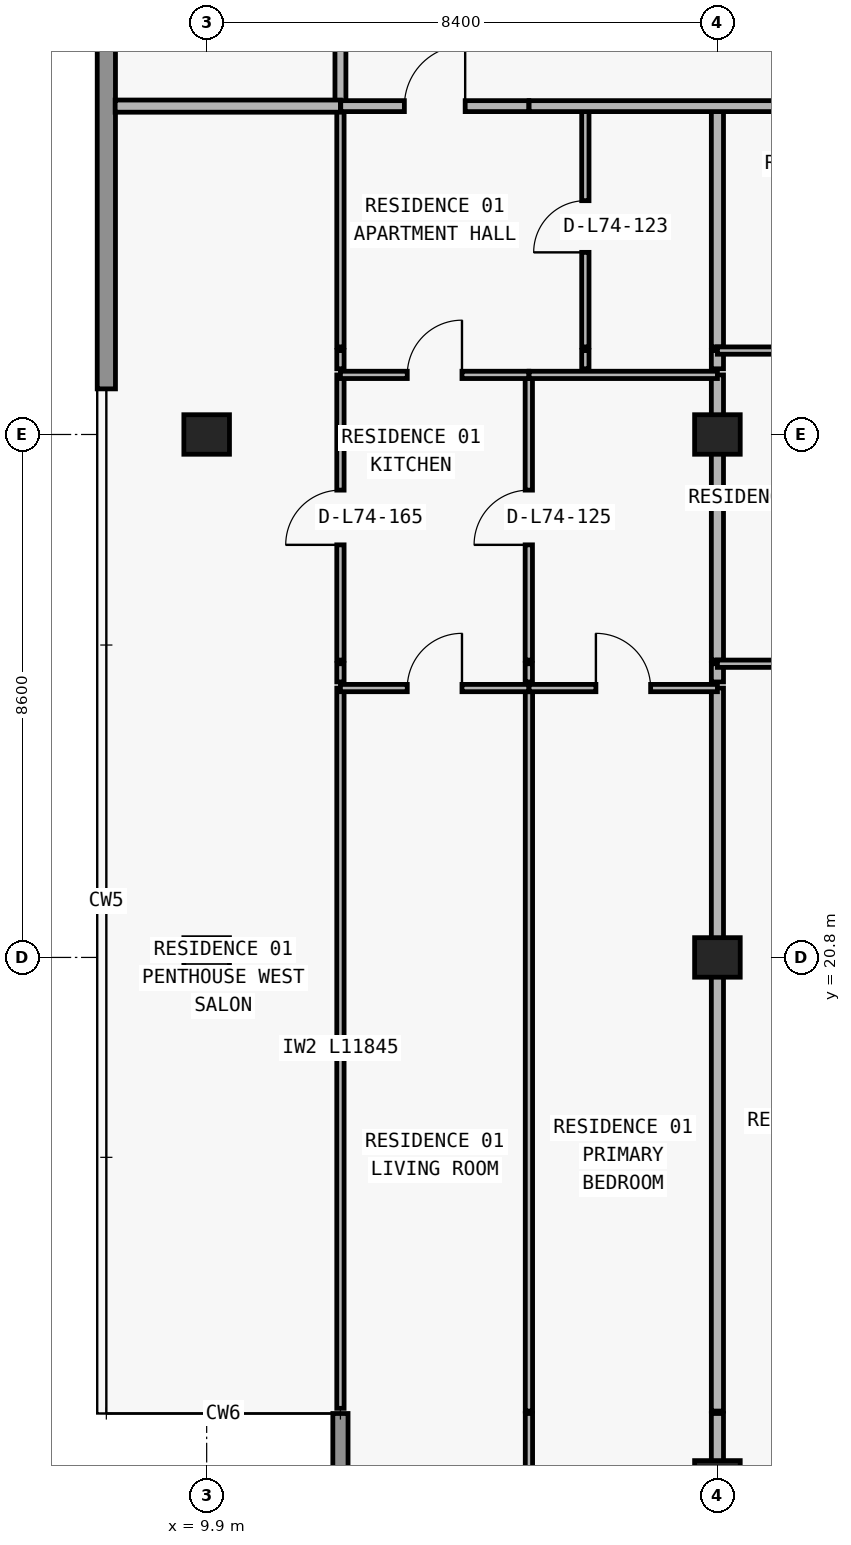
"""IFC4 building model, lengths in metres.
Left out: names, types, materials, properties, quantities, classifications, styles, units other than length and angle.
Written with IfcOpenShell. Run it as: python <this file> out.ifc"""

import sys

from ifc_helpers import new_model, si_unit, direction, frame, frame_2d, origin, origin_2d, place, context, subcontext, project, spatial, rectangle, extrude, element, fill, save


model = new_model("IFC4")
c1 = context("Model", 3, precision=1e-05, world=origin(), true_north=direction((0.0, 1.0)))
c2 = subcontext(c1, "Body", "Model", "MODEL_VIEW")
j1 = project(units=[si_unit("LENGTHUNIT", "METRE"), si_unit("PLANEANGLEUNIT", "RADIAN")], contexts=[c1])
p1 = place(None, origin())
s1 = spatial("IfcSite", under=j1, at=p1, CompositionType="ELEMENT")
p2 = place(p1, origin())
s2 = spatial("IfcBuilding", under=s1, at=p2, CompositionType="ELEMENT")
p3 = place(p2, frame((0.0, 0.0, 262.8)))
s3 = spatial("IfcBuildingStorey", under=s2, at=p3, CompositionType="ELEMENT", Elevation=262.8)
for number, where, z_axis, x_axis in (
    (1, (18.3, 12.2, 0.0), (0.0, 0.0, 1.0), (1.0, 0.0, 0.0)),
    (2, (9.9, 20.8, 0.0), (0.0, 0.0, 1.0), (1.0, 0.0, 0.0)),
    (3, (18.3, 20.8, 0.0), (0.0, 0.0, 1.0), (1.0, 0.0, 0.0)),
    (4, (9.9, 29.4, 0.0), (0.0, 0.0, 1.0), (1.0, 0.0, 0.0)),
    (5, (18.3, 29.4, 0.0), (0.0, 0.0, 1.0), (1.0, 0.0, 0.0)),
):
    element("IfcColumn", number, at=place(p3, frame(where, z_axis=z_axis, x_axis=x_axis)), inside=s3, PredefinedType="COLUMN", context=c2, shape_type="SweptSolid", body=[
        extrude(rectangle(XDim=0.75, YDim=0.65, at=origin_2d()), origin(), (0.0, 0.0, 1.0), 3.05),
    ])
p4 = place(p3, frame((12.1, 13.3, 0.0), z_axis=(0.0, 0.0, 1.0), x_axis=(0.0, -1.0, 0.0)))
e6 = element("IfcWall", 6, at=p4, inside=s3, PredefinedType="ELEMENTEDWALL", context=c2, shape_type="SweptSolid", body=[
    extrude(rectangle(XDim=3.45, YDim=0.25, at=frame_2d((1.725, 0.0))), origin(), (0.0, 0.0, 1.0), 3.05),
])
p5 = place(p3, frame((8.25, 30.15, 0.0), z_axis=(0.0, 0.0, 1.0), x_axis=(0.0, 1.0, 0.0)))
e7 = element("IfcWall", 7, at=p5, inside=s3, PredefinedType="STANDARD", context=c2, shape_type="SweptSolid", body=[
    extrude(rectangle(XDim=16.85, YDim=0.3, at=frame_2d((8.425, 0.0))), origin(), (0.0, 0.0, 1.0), 3.05),
])
p6 = place(p3, frame((12.1, 13.385, 0.0), z_axis=(0.0, 0.0, 1.0), x_axis=(0.0, 1.0, 0.0)))
e8 = element("IfcWall", 8, at=p6, inside=s3, PredefinedType="PARTITIONING", context=c2, shape_type="SweptSolid", body=[
    extrude(rectangle(XDim=11.845, YDim=0.12, at=frame_2d((5.922, 0.0))), origin(), (0.0, 0.0, 1.0), 2.578),
])
p7 = place(p3, frame((12.1, 25.33, 0.0), z_axis=(0.0, 0.0, 1.0), x_axis=(0.0, 1.0, 0.0)))
e9 = element("IfcWall", 9, at=p7, inside=s3, PredefinedType="PARTITIONING", context=c2, shape_type="SweptSolid", body=[
    extrude(rectangle(XDim=0.3, YDim=0.12, at=frame_2d((0.15, 0.0))), origin(), (0.0, 0.0, 1.0), 2.578),
])
p8 = place(p3, frame((12.1, 25.69, 0.0), z_axis=(0.0, 0.0, 1.0), x_axis=(0.0, 1.0, 0.0)))
e10 = element("IfcWall", 10, at=p8, inside=s3, PredefinedType="PARTITIONING", context=c2, shape_type="SweptSolid", body=[
    extrude(rectangle(XDim=4.69, YDim=0.12, at=frame_2d((2.345, 0.0))), origin(), (0.0, 0.0, 1.0), 2.578),
])
p9 = place(p8, frame((1.895, 0.0, 0.0)))
e11 = element("IfcOpeningElement", 11, at=p9, cuts=e10, PredefinedType="OPENING", context=c2, shape_type="SweptSolid", body=[
    extrude(rectangle(XDim=0.9, YDim=2.15, at=frame_2d((0.45, 1.075))), frame((0.0, 0.07, 0.0), z_axis=(0.0, -1.0, 0.0), x_axis=(1.0, 0.0, 0.0)), (0.0, 0.0, 1.0), 0.14),
])
p10 = place(p3, frame((12.1, 30.48, 0.0), z_axis=(0.0, 0.0, 1.0), x_axis=(0.0, 1.0, 0.0)))
e12 = element("IfcWall", 12, at=p10, inside=s3, PredefinedType="PARTITIONING", context=c2, shape_type="SweptSolid", body=[
    extrude(rectangle(XDim=0.3, YDim=0.12, at=frame_2d((0.15, 0.0))), origin(), (0.0, 0.0, 1.0), 2.578),
])
p11 = place(p3, frame((12.1, 30.84, 0.0), z_axis=(0.0, 0.0, 1.0), x_axis=(0.0, 1.0, 0.0)))
e13 = element("IfcWall", 13, at=p11, inside=s3, PredefinedType="PARTITIONING", context=c2, shape_type="SweptSolid", body=[
    extrude(rectangle(XDim=3.96, YDim=0.12, at=frame_2d((1.98, 0.0))), origin(), (0.0, 0.0, 1.0), 2.578),
])
p12 = place(p3, frame((12.1, 34.805, 0.0), z_axis=(0.0, 0.0, 1.0), x_axis=(0.0, 1.0, 0.0)))
e14 = element("IfcWall", 14, at=p12, inside=s3, PredefinedType="PARTITIONING", context=c2, shape_type="SweptSolid", body=[
    extrude(rectangle(XDim=2.195, YDim=0.18, at=frame_2d((1.098, 0.0))), origin(), (0.0, 0.0, 1.0), 2.578),
])
p13 = place(p3, frame((15.198, 25.33, 0.0), z_axis=(0.0, 0.0, 1.0), x_axis=(0.0, 1.0, 0.0)))
e15 = element("IfcWall", 15, at=p13, inside=s3, PredefinedType="PARTITIONING", context=c2, shape_type="SweptSolid", body=[
    extrude(rectangle(XDim=0.3, YDim=0.12, at=frame_2d((0.15, 0.0))), origin(), (0.0, 0.0, 1.0), 3.05),
])
p14 = place(p3, frame((15.198, 25.69, 0.0), z_axis=(0.0, 0.0, 1.0), x_axis=(0.0, 1.0, 0.0)))
e16 = element("IfcWall", 16, at=p14, inside=s3, PredefinedType="PARTITIONING", context=c2, shape_type="SweptSolid", body=[
    extrude(rectangle(XDim=4.69, YDim=0.12, at=frame_2d((2.345, 0.0))), origin(), (0.0, 0.0, 1.0), 3.05),
])
p15 = place(p14, frame((1.895, 0.0, 0.0)))
e17 = element("IfcOpeningElement", 17, at=p15, cuts=e16, PredefinedType="OPENING", context=c2, shape_type="SweptSolid", body=[
    extrude(rectangle(XDim=0.9, YDim=2.15, at=frame_2d((0.45, 1.075))), frame((0.0, 0.07, 0.0), z_axis=(0.0, -1.0, 0.0), x_axis=(1.0, 0.0, 0.0)), (0.0, 0.0, 1.0), 0.14),
])
p16 = place(p3, frame((15.2, 9.995, 0.0), z_axis=(0.0, 0.0, 1.0), x_axis=(0.0, 1.0, 0.0)))
e18 = element("IfcWall", 18, at=p16, inside=s3, PredefinedType="PARTITIONING", context=c2, shape_type="SweptSolid", body=[
    extrude(rectangle(XDim=3.305, YDim=0.12, at=frame_2d((1.652, 0.0))), origin(), (0.0, 0.0, 1.0), 3.05),
])
p17 = place(p3, frame((15.2, 13.34, 0.0), z_axis=(0.0, 0.0, 1.0), x_axis=(0.0, 1.0, 0.0)))
e19 = element("IfcWall", 19, at=p17, inside=s3, PredefinedType="PARTITIONING", context=c2, shape_type="SweptSolid", body=[
    extrude(rectangle(XDim=11.89, YDim=0.12, at=frame_2d((5.945, 0.0))), origin(), (0.0, 0.0, 1.0), 3.05),
])
p18 = place(p3, frame((16.128, 30.48, 0.0), z_axis=(0.0, 0.0, 1.0), x_axis=(0.0, 1.0, 0.0)))
e20 = element("IfcWall", 20, at=p18, inside=s3, PredefinedType="PARTITIONING", context=c2, shape_type="SweptSolid", body=[
    extrude(rectangle(XDim=0.3, YDim=0.12, at=frame_2d((0.15, 0.0))), origin(), (0.0, 0.0, 1.0), 2.629),
])
p19 = place(p3, frame((16.128, 30.84, 0.0), z_axis=(0.0, 0.0, 1.0), x_axis=(0.0, 1.0, 0.0)))
e21 = element("IfcWall", 21, at=p19, inside=s3, PredefinedType="PARTITIONING", context=c2, shape_type="SweptSolid", body=[
    extrude(rectangle(XDim=3.96, YDim=0.12, at=frame_2d((1.98, 0.0))), origin(), (0.0, 0.0, 1.0), 2.629),
])
p20 = place(p19, frame((1.555, 0.0, 0.0)))
e22 = element("IfcOpeningElement", 22, at=p20, cuts=e21, PredefinedType="OPENING", context=c2, shape_type="SweptSolid", body=[
    extrude(rectangle(XDim=0.85, YDim=2.1, at=frame_2d((0.425, 1.05))), frame((0.0, 0.07, 0.0), z_axis=(0.0, -1.0, 0.0), x_axis=(1.0, 0.0, 0.0)), (0.0, 0.0, 1.0), 0.14),
])
p21 = place(p3, frame((18.3, 9.995, 0.0), z_axis=(0.0, 0.0, 1.0), x_axis=(0.0, 1.0, 0.0)))
e23 = element("IfcWall", 23, at=p21, inside=s3, PredefinedType="PARTITIONING", context=c2, shape_type="SweptSolid", body=[
    extrude(rectangle(XDim=3.305, YDim=0.2, at=frame_2d((1.652, 0.0))), origin(), (0.0, 0.0, 1.0), 2.263),
])
p22 = place(p3, frame((18.3, 13.34, 0.0), z_axis=(0.0, 0.0, 1.0), x_axis=(0.0, 1.0, 0.0)))
e24 = element("IfcWall", 24, at=p22, inside=s3, PredefinedType="PARTITIONING", context=c2, shape_type="SweptSolid", body=[
    extrude(rectangle(XDim=11.89, YDim=0.2, at=frame_2d((5.945, 0.0))), origin(), (0.0, 0.0, 1.0), 2.263),
])
p23 = place(p3, frame((18.3, 25.33, 0.0), z_axis=(0.0, 0.0, 1.0), x_axis=(0.0, 1.0, 0.0)))
e25 = element("IfcWall", 25, at=p23, inside=s3, PredefinedType="PARTITIONING", context=c2, shape_type="SweptSolid", body=[
    extrude(rectangle(XDim=0.3, YDim=0.2, at=frame_2d((0.15, 0.0))), origin(), (0.0, 0.0, 1.0), 2.263),
])
p24 = place(p3, frame((18.3, 25.69, 0.0), z_axis=(0.0, 0.0, 1.0), x_axis=(0.0, 1.0, 0.0)))
e26 = element("IfcWall", 26, at=p24, inside=s3, PredefinedType="PARTITIONING", context=c2, shape_type="SweptSolid", body=[
    extrude(rectangle(XDim=4.69, YDim=0.2, at=frame_2d((2.345, 0.0))), origin(), (0.0, 0.0, 1.0), 2.263),
])
p25 = place(p3, frame((18.3, 30.48, 0.0), z_axis=(0.0, 0.0, 1.0), x_axis=(0.0, 1.0, 0.0)))
e27 = element("IfcWall", 27, at=p25, inside=s3, PredefinedType="PARTITIONING", context=c2, shape_type="SweptSolid", body=[
    extrude(rectangle(XDim=0.3, YDim=0.2, at=frame_2d((0.15, 0.0))), origin(), (0.0, 0.0, 1.0), 2.263),
])
p26 = place(p3, frame((18.3, 30.84, 0.0), z_axis=(0.0, 0.0, 1.0), x_axis=(0.0, 1.0, 0.0)))
e28 = element("IfcWall", 28, at=p26, inside=s3, PredefinedType="PARTITIONING", context=c2, shape_type="SweptSolid", body=[
    extrude(rectangle(XDim=3.96, YDim=0.2, at=frame_2d((1.98, 0.0))), origin(), (0.0, 0.0, 1.0), 2.263),
])
p27 = place(p3, frame((12.1, 25.23, 0.0), z_axis=(0.0, 0.0, 1.0), x_axis=(1.0, 0.0, 0.0)))
e29 = element("IfcWall", 29, at=p27, inside=s3, PredefinedType="PARTITIONING", context=c2, shape_type="SweptSolid", body=[
    extrude(rectangle(XDim=3.098, YDim=0.12, at=frame_2d((1.549, 0.0))), origin(), (0.0, 0.0, 1.0), 3.05),
])
p28 = place(p27, frame((1.099, 0.0, 0.0)))
e30 = element("IfcOpeningElement", 30, at=p28, cuts=e29, PredefinedType="OPENING", context=c2, shape_type="SweptSolid", body=[
    extrude(rectangle(XDim=0.9, YDim=2.15, at=frame_2d((0.45, 1.075))), frame((0.0, 0.07, 0.0), z_axis=(0.0, -1.0, 0.0), x_axis=(1.0, 0.0, 0.0)), (0.0, 0.0, 1.0), 0.14),
])
p29 = place(p3, frame((15.203, 25.23, 0.0), z_axis=(0.0, 0.0, 1.0), x_axis=(1.0, 0.0, 0.0)))
e31 = element("IfcWall", 31, at=p29, inside=s3, PredefinedType="PARTITIONING", context=c2, shape_type="SweptSolid", body=[
    extrude(rectangle(XDim=3.097, YDim=0.12, at=frame_2d((1.549, 0.0))), origin(), (0.0, 0.0, 1.0), 3.05),
])
p30 = place(p29, frame((1.098, 0.0, 0.0)))
e32 = element("IfcOpeningElement", 32, at=p30, cuts=e31, PredefinedType="OPENING", context=c2, shape_type="SweptSolid", body=[
    extrude(rectangle(XDim=0.9, YDim=2.15, at=frame_2d((0.45, 1.075))), frame((0.0, 0.07, 0.0), z_axis=(0.0, -1.0, 0.0), x_axis=(1.0, 0.0, 0.0)), (0.0, 0.0, 1.0), 0.14),
])
p31 = place(p3, frame((18.3, 25.63, 0.0), z_axis=(0.0, 0.0, 1.0), x_axis=(1.0, 0.0, 0.0)))
e33 = element("IfcWall", 33, at=p31, inside=s3, PredefinedType="PARTITIONING", context=c2, shape_type="SweptSolid", body=[
    extrude(rectangle(XDim=8.18, YDim=0.12, at=frame_2d((4.09, 0.0))), origin(), (0.0, 0.0, 1.0), 3.05),
])
p32 = place(p31, frame((1.818, 0.0, 0.0)))
e34 = element("IfcOpeningElement", 34, at=p32, cuts=e33, PredefinedType="OPENING", context=c2, shape_type="SweptSolid", body=[
    extrude(rectangle(XDim=0.9, YDim=2.15, at=frame_2d((0.45, 1.075))), frame((0.0, 0.07, 0.0), z_axis=(0.0, -1.0, 0.0), x_axis=(1.0, 0.0, 0.0)), (0.0, 0.0, 1.0), 0.14),
])
p33 = place(p31, frame((5.95, 0.0, 0.0)))
e35 = element("IfcOpeningElement", 35, at=p33, cuts=e33, PredefinedType="OPENING", context=c2, shape_type="SweptSolid", body=[
    extrude(rectangle(XDim=0.9, YDim=2.15, at=frame_2d((0.45, 1.075))), frame((0.0, 0.07, 0.0), z_axis=(0.0, -1.0, 0.0), x_axis=(1.0, 0.0, 0.0)), (0.0, 0.0, 1.0), 0.14),
])
p34 = place(p3, frame((12.1, 30.38, 0.0), z_axis=(0.0, 0.0, 1.0), x_axis=(1.0, 0.0, 0.0)))
e36 = element("IfcWall", 36, at=p34, inside=s3, PredefinedType="PARTITIONING", context=c2, shape_type="SweptSolid", body=[
    extrude(rectangle(XDim=3.098, YDim=0.12, at=frame_2d((1.549, 0.0))), origin(), (0.0, 0.0, 1.0), 3.05),
])
p35 = place(p34, frame((1.099, 0.0, 0.0)))
e37 = element("IfcOpeningElement", 37, at=p35, cuts=e36, PredefinedType="OPENING", context=c2, shape_type="SweptSolid", body=[
    extrude(rectangle(XDim=0.9, YDim=2.15, at=frame_2d((0.45, 1.075))), frame((0.0, 0.07, 0.0), z_axis=(0.0, -1.0, 0.0), x_axis=(1.0, 0.0, 0.0)), (0.0, 0.0, 1.0), 0.14),
])
p36 = place(p3, frame((15.203, 30.38, 0.0), z_axis=(0.0, 0.0, 1.0), x_axis=(1.0, 0.0, 0.0)))
e38 = element("IfcWall", 38, at=p36, inside=s3, PredefinedType="PARTITIONING", context=c2, shape_type="SweptSolid", body=[
    extrude(rectangle(XDim=3.097, YDim=0.12, at=frame_2d((1.549, 0.0))), origin(), (0.0, 0.0, 1.0), 3.05),
])
p37 = place(p3, frame((18.3, 30.78, 0.0), z_axis=(0.0, 0.0, 1.0), x_axis=(1.0, 0.0, 0.0)))
e39 = element("IfcWall", 39, at=p37, inside=s3, PredefinedType="PARTITIONING", context=c2, shape_type="SweptSolid", body=[
    extrude(rectangle(XDim=8.4, YDim=0.12, at=frame_2d((4.2, 0.0))), origin(), (0.0, 0.0, 1.0), 3.05),
])
p38 = place(p37, frame((1.818, 0.0, 0.0)))
e40 = element("IfcOpeningElement", 40, at=p38, cuts=e39, PredefinedType="OPENING", context=c2, shape_type="SweptSolid", body=[
    extrude(rectangle(XDim=0.9, YDim=2.15, at=frame_2d((0.45, 1.075))), frame((0.0, 0.07, 0.0), z_axis=(0.0, -1.0, 0.0), x_axis=(1.0, 0.0, 0.0)), (0.0, 0.0, 1.0), 0.14),
])
p39 = place(p3, frame((8.395, 34.8, 0.0), z_axis=(0.0, 0.0, 1.0), x_axis=(1.0, 0.0, 0.0)))
e41 = element("IfcWall", 41, at=p39, inside=s3, PredefinedType="PARTITIONING", context=c2, shape_type="SweptSolid", body=[
    extrude(rectangle(XDim=3.705, YDim=0.2, at=frame_2d((1.853, 0.0))), origin(), (0.0, 0.0, 1.0), 3.05),
])
p40 = place(p3, frame((12.105, 34.8, 0.0), z_axis=(0.0, 0.0, 1.0), x_axis=(1.0, 0.0, 0.0)))
e42 = element("IfcWall", 42, at=p40, inside=s3, PredefinedType="PARTITIONING", context=c2, shape_type="SweptSolid", body=[
    extrude(rectangle(XDim=3.093, YDim=0.18, at=frame_2d((1.546, 0.0))), origin(), (0.0, 0.0, 1.0), 3.05),
])
p41 = place(p40, frame((1.046, 0.0, 0.0)))
e43 = element("IfcOpeningElement", 43, at=p41, cuts=e42, PredefinedType="OPENING", context=c2, shape_type="SweptSolid", body=[
    extrude(rectangle(XDim=1.0, YDim=2.2, at=frame_2d((0.5, 1.1))), frame((0.0, 0.1, 0.0), z_axis=(0.0, -1.0, 0.0), x_axis=(1.0, 0.0, 0.0)), (0.0, 0.0, 1.0), 0.2),
])
p42 = place(p3, frame((15.203, 34.8, 0.0), z_axis=(0.0, 0.0, 1.0), x_axis=(1.0, 0.0, 0.0)))
e44 = element("IfcWall", 44, at=p42, inside=s3, PredefinedType="PARTITIONING", context=c2, shape_type="SweptSolid", body=[
    extrude(rectangle(XDim=16.283, YDim=0.18, at=frame_2d((8.142, 0.0))), origin(), (0.0, 0.0, 1.0), 3.05),
])
p43 = place(p42, frame((5.516, 0.0, 0.0)))
e45 = element("IfcOpeningElement", 45, at=p43, cuts=e44, PredefinedType="OPENING", context=c2, shape_type="SweptSolid", body=[
    extrude(rectangle(XDim=1.0, YDim=2.2, at=frame_2d((0.5, 1.1))), frame((0.0, 0.1, 0.0), z_axis=(0.0, -1.0, 0.0), x_axis=(1.0, 0.0, 0.0)), (0.0, 0.0, 1.0), 0.2),
])
p44 = place(p42, frame((13.39, 0.0, 0.0)))
e46 = element("IfcOpeningElement", 46, at=p44, cuts=e44, PredefinedType="OPENING", context=c2, shape_type="SweptSolid", body=[
    extrude(rectangle(XDim=1.0, YDim=2.2, at=frame_2d((0.5, 1.1))), frame((0.0, 0.1, 0.0), z_axis=(0.0, -1.0, 0.0), x_axis=(1.0, 0.0, 0.0)), (0.0, 0.0, 1.0), 0.2),
])
p45 = place(p41, origin())
e47 = element("IfcDoor", 47, at=p45, inside=s3, OperationType="SINGLE_SWING_RIGHT", PredefinedType="DOOR", context=c2, shape_type="SweptSolid", body=[
    extrude(rectangle(XDim=1.0, YDim=2.2, at=frame_2d((0.5, 1.1))), frame((0.0, 0.025, 0.0), z_axis=(0.0, -1.0, 0.0), x_axis=(1.0, 0.0, 0.0)), (0.0, 0.0, 1.0), 0.05),
])
fill(e43, e47)
p46 = place(p20, origin())
e48 = element("IfcDoor", 48, at=p46, inside=s3, OperationType="SINGLE_SWING_LEFT", PredefinedType="DOOR", context=c2, shape_type="SweptSolid", body=[
    extrude(rectangle(XDim=0.85, YDim=2.1, at=frame_2d((0.425, 1.05))), frame((0.0, 0.025, 0.0), z_axis=(0.0, -1.0, 0.0), x_axis=(1.0, 0.0, 0.0)), (0.0, 0.0, 1.0), 0.05),
])
fill(e22, e48)
p47 = place(p35, origin())
e49 = element("IfcDoor", 49, at=p47, inside=s3, OperationType="SINGLE_SWING_RIGHT", PredefinedType="DOOR", context=c2, shape_type="SweptSolid", body=[
    extrude(rectangle(XDim=0.9, YDim=2.15, at=frame_2d((0.45, 1.075))), frame((0.0, 0.025, 0.0), z_axis=(0.0, -1.0, 0.0), x_axis=(1.0, 0.0, 0.0)), (0.0, 0.0, 1.0), 0.05),
])
fill(e37, e49)
p48 = place(p15, origin())
e50 = element("IfcDoor", 50, at=p48, inside=s3, OperationType="SINGLE_SWING_LEFT", PredefinedType="DOOR", context=c2, shape_type="SweptSolid", body=[
    extrude(rectangle(XDim=0.9, YDim=2.15, at=frame_2d((0.45, 1.075))), frame((0.0, 0.025, 0.0), z_axis=(0.0, -1.0, 0.0), x_axis=(1.0, 0.0, 0.0)), (0.0, 0.0, 1.0), 0.05),
])
fill(e17, e50)
p49 = place(p28, origin())
e51 = element("IfcDoor", 51, at=p49, inside=s3, OperationType="SINGLE_SWING_RIGHT", PredefinedType="DOOR", context=c2, shape_type="SweptSolid", body=[
    extrude(rectangle(XDim=0.9, YDim=2.15, at=frame_2d((0.45, 1.075))), frame((0.0, 0.025, 0.0), z_axis=(0.0, -1.0, 0.0), x_axis=(1.0, 0.0, 0.0)), (0.0, 0.0, 1.0), 0.05),
])
fill(e30, e51)
p50 = place(p30, origin())
e52 = element("IfcDoor", 52, at=p50, inside=s3, OperationType="SINGLE_SWING_LEFT", PredefinedType="DOOR", context=c2, shape_type="SweptSolid", body=[
    extrude(rectangle(XDim=0.9, YDim=2.15, at=frame_2d((0.45, 1.075))), frame((0.0, 0.025, 0.0), z_axis=(0.0, -1.0, 0.0), x_axis=(1.0, 0.0, 0.0)), (0.0, 0.0, 1.0), 0.05),
])
fill(e32, e52)
p51 = place(p9, origin())
e53 = element("IfcDoor", 53, at=p51, inside=s3, OperationType="SINGLE_SWING_LEFT", PredefinedType="DOOR", context=c2, shape_type="SweptSolid", body=[
    extrude(rectangle(XDim=0.9, YDim=2.15, at=frame_2d((0.45, 1.075))), frame((0.0, 0.025, 0.0), z_axis=(0.0, -1.0, 0.0), x_axis=(1.0, 0.0, 0.0)), (0.0, 0.0, 1.0), 0.05),
])
fill(e11, e53)
save(model, sys.argv[1])
